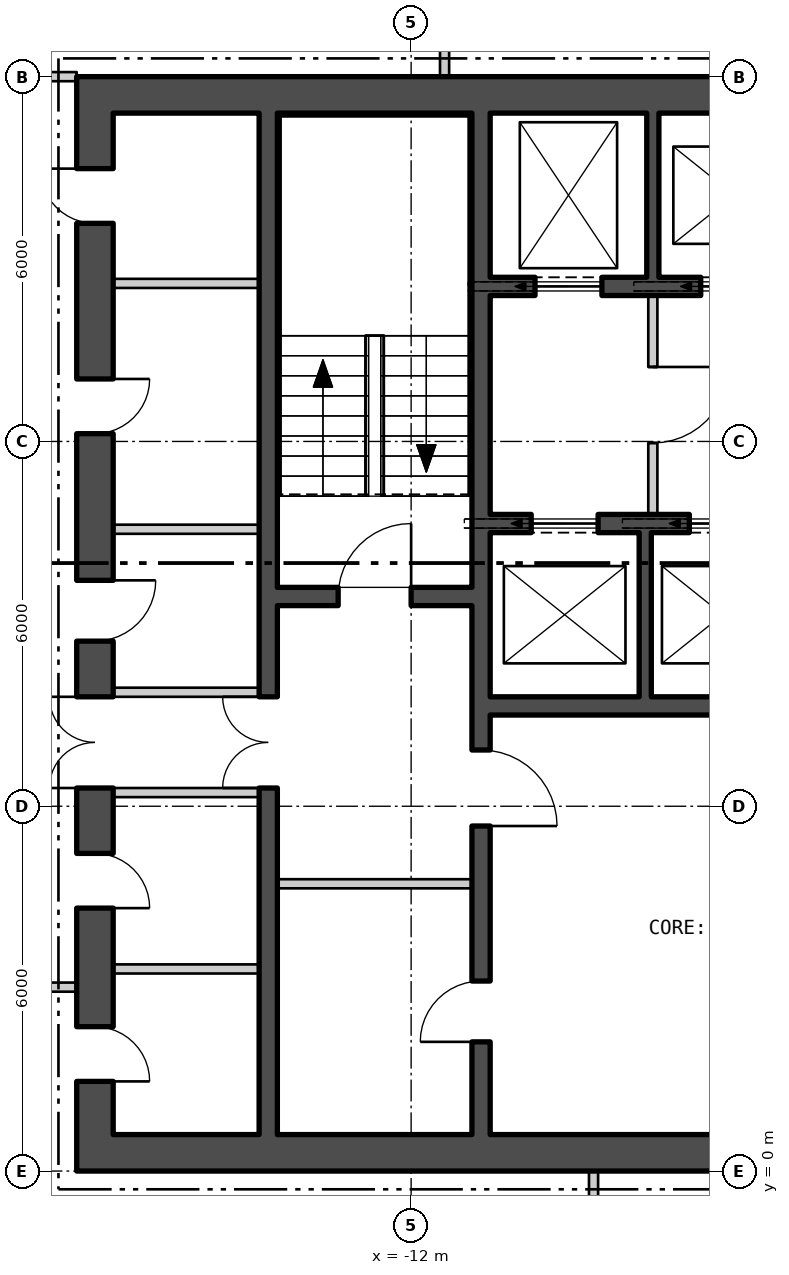
"""IFC4 building model, lengths in metres.
Left out: names, types, materials, properties, quantities, classifications, styles, units other than length and angle.
Written with IfcOpenShell. Run it as: python <this file> out.ifc"""

import sys

from ifc_helpers import new_model, si_unit, direction, frame, frame_2d, origin, place, context, subcontext, project, spatial, rectangle, extrude, element, fill, save


model = new_model("IFC4")
c1 = context("Model", 3, precision=1e-05, world=origin(), true_north=direction((0.0, 1.0)))
c2 = subcontext(c1, "Body", "Model", "MODEL_VIEW")
j1 = project(units=[si_unit("LENGTHUNIT", "METRE"), si_unit("PLANEANGLEUNIT", "RADIAN")], contexts=[c1])
p1 = place(None, origin())
s1 = spatial("IfcSite", under=j1, at=p1, CompositionType="ELEMENT")
p2 = place(p1, origin())
s2 = spatial("IfcBuilding", under=s1, at=p2, CompositionType="ELEMENT")
p3 = place(p2, frame((0.0, 0.0, 18.6)))
s3 = spatial("IfcBuildingStorey", under=s2, at=p3, CompositionType="ELEMENT", Elevation=18.6)
p4 = place(p3, frame((-17.5, 0.3, 0.0), z_axis=(0.0, 0.0, 1.0), x_axis=(1.0, 0.0, 0.0)))
e1 = element("IfcWall", 1, at=p4, inside=s3, PredefinedType="SHEAR", context=c2, shape_type="SweptSolid", body=[
    extrude(rectangle(XDim=35.0, YDim=0.6, at=frame_2d((17.5, 0.0))), origin(), (0.0, 0.0, 1.0), 4.88),
])
p5 = place(p4, frame((12.0, 0.0, 0.0)))
e2 = element("IfcOpeningElement", 2, at=p5, cuts=e1, PredefinedType="OPENING", context=c2, shape_type="SweptSolid", body=[
    extrude(rectangle(XDim=1.8, YDim=2.4, at=frame_2d((0.9, 1.2))), frame((0.0, 0.31, 0.0), z_axis=(0.0, -1.0, 0.0), x_axis=(1.0, 0.0, 0.0)), (0.0, 0.0, 1.0), 0.62),
])
p6 = place(p4, frame((22.0, 0.0, 0.0)))
e3 = element("IfcOpeningElement", 3, at=p6, cuts=e1, PredefinedType="OPENING", context=c2, shape_type="SweptSolid", body=[
    extrude(rectangle(XDim=1.8, YDim=2.4, at=frame_2d((0.9, 1.2))), frame((0.0, 0.31, 0.0), z_axis=(0.0, -1.0, 0.0), x_axis=(1.0, 0.0, 0.0)), (0.0, 0.0, 1.0), 0.62),
])
p7 = place(p3, frame((-17.5, 17.7, 0.0), z_axis=(0.0, 0.0, 1.0), x_axis=(1.0, 0.0, 0.0)))
e4 = element("IfcWall", 4, at=p7, inside=s3, PredefinedType="SHEAR", context=c2, shape_type="SweptSolid", body=[
    extrude(rectangle(XDim=35.0, YDim=0.6, at=frame_2d((17.5, 0.0))), origin(), (0.0, 0.0, 1.0), 4.88),
])
p8 = place(p3, frame((-17.2, 0.6, 0.0), z_axis=(0.0, 0.0, 1.0), x_axis=(0.0, 1.0, 0.0)))
e5 = element("IfcWall", 5, at=p8, inside=s3, PredefinedType="SHEAR", context=c2, shape_type="SweptSolid", body=[
    extrude(rectangle(XDim=16.8, YDim=0.6, at=frame_2d((8.4, 0.0))), origin(), (0.0, 0.0, 1.0), 4.88),
])
p9 = place(p8, frame((5.7, 0.0, 0.0)))
e6 = element("IfcOpeningElement", 6, at=p9, cuts=e5, PredefinedType="OPENING", context=c2, shape_type="SweptSolid", body=[
    extrude(rectangle(XDim=1.5, YDim=2.1, at=frame_2d((0.75, 1.05))), frame((0.0, 0.31, 0.0), z_axis=(0.0, -1.0, 0.0), x_axis=(1.0, 0.0, 0.0)), (0.0, 0.0, 1.0), 0.62),
])
p10 = place(p8, frame((0.875, 0.0, 0.0)))
e7 = element("IfcOpeningElement", 7, at=p10, cuts=e5, PredefinedType="OPENING", context=c2, shape_type="SweptSolid", body=[
    extrude(rectangle(XDim=0.9, YDim=2.1, at=frame_2d((0.45, 1.05))), frame((0.0, 0.31, 0.0), z_axis=(0.0, -1.0, 0.0), x_axis=(1.0, 0.0, 0.0)), (0.0, 0.0, 1.0), 0.62),
])
p11 = place(p8, frame((3.724, 0.0, 0.0)))
e8 = element("IfcOpeningElement", 8, at=p11, cuts=e5, PredefinedType="OPENING", context=c2, shape_type="SweptSolid", body=[
    extrude(rectangle(XDim=0.9, YDim=2.1, at=frame_2d((0.45, 1.05))), frame((0.0, 0.31, 0.0), z_axis=(0.0, -1.0, 0.0), x_axis=(1.0, 0.0, 0.0)), (0.0, 0.0, 1.0), 0.62),
])
p12 = place(p8, frame((8.115, 0.0, 0.0)))
e9 = element("IfcOpeningElement", 9, at=p12, cuts=e5, PredefinedType="OPENING", context=c2, shape_type="SweptSolid", body=[
    extrude(rectangle(XDim=1.0, YDim=2.1, at=frame_2d((0.5, 1.05))), frame((0.0, 0.31, 0.0), z_axis=(0.0, -1.0, 0.0), x_axis=(1.0, 0.0, 0.0)), (0.0, 0.0, 1.0), 0.62),
])
p13 = place(p8, frame((11.528, 0.0, 0.0)))
e10 = element("IfcOpeningElement", 10, at=p13, cuts=e5, PredefinedType="OPENING", context=c2, shape_type="SweptSolid", body=[
    extrude(rectangle(XDim=0.9, YDim=2.1, at=frame_2d((0.45, 1.05))), frame((0.0, 0.31, 0.0), z_axis=(0.0, -1.0, 0.0), x_axis=(1.0, 0.0, 0.0)), (0.0, 0.0, 1.0), 0.62),
])
p14 = place(p8, frame((14.987, 0.0, 0.0)))
e11 = element("IfcOpeningElement", 11, at=p14, cuts=e5, PredefinedType="OPENING", context=c2, shape_type="SweptSolid", body=[
    extrude(rectangle(XDim=0.9, YDim=2.1, at=frame_2d((0.45, 1.05))), frame((0.0, 0.31, 0.0), z_axis=(0.0, -1.0, 0.0), x_axis=(1.0, 0.0, 0.0)), (0.0, 0.0, 1.0), 0.62),
])
p15 = place(p3, frame((-10.85, 0.6, 0.0), z_axis=(0.0, 0.0, 1.0), x_axis=(0.0, 1.0, 0.0)))
e12 = element("IfcWall", 12, at=p15, inside=s3, PredefinedType="SHEAR", context=c2, shape_type="SweptSolid", body=[
    extrude(rectangle(XDim=16.8, YDim=0.3, at=frame_2d((8.4, 0.0))), origin(), (0.0, 0.0, 1.0), 4.88),
])
p16 = place(p15, frame((5.075, 0.0, 0.0)))
e13 = element("IfcOpeningElement", 13, at=p16, cuts=e12, PredefinedType="OPENING", context=c2, shape_type="SweptSolid", body=[
    extrude(rectangle(XDim=1.25, YDim=2.1, at=frame_2d((0.625, 1.05))), frame((0.0, 0.16, 0.0), z_axis=(0.0, -1.0, 0.0), x_axis=(1.0, 0.0, 0.0)), (0.0, 0.0, 1.0), 0.32),
])
p17 = place(p15, frame((1.525, 0.0, 0.0)))
e14 = element("IfcOpeningElement", 14, at=p17, cuts=e12, PredefinedType="OPENING", context=c2, shape_type="SweptSolid", body=[
    extrude(rectangle(XDim=1.0, YDim=2.1, at=frame_2d((0.5, 1.05))), frame((0.0, 0.16, 0.0), z_axis=(0.0, -1.0, 0.0), x_axis=(1.0, 0.0, 0.0)), (0.0, 0.0, 1.0), 0.32),
])
p18 = place(p3, frame((-14.35, 0.6, 0.0), z_axis=(0.0, 0.0, 1.0), x_axis=(0.0, 1.0, 0.0)))
e15 = element("IfcWall", 15, at=p18, inside=s3, PredefinedType="SHEAR", context=c2, shape_type="SweptSolid", body=[
    extrude(rectangle(XDim=16.8, YDim=0.3, at=frame_2d((8.4, 0.0))), origin(), (0.0, 0.0, 1.0), 4.88),
])
p19 = place(p18, frame((5.7, 0.0, 0.0)))
e16 = element("IfcOpeningElement", 16, at=p19, cuts=e15, PredefinedType="OPENING", context=c2, shape_type="SweptSolid", body=[
    extrude(rectangle(XDim=1.5, YDim=2.1, at=frame_2d((0.75, 1.05))), frame((0.0, 0.16, 0.0), z_axis=(0.0, -1.0, 0.0), x_axis=(1.0, 0.0, 0.0)), (0.0, 0.0, 1.0), 0.32),
])
p20 = place(p3, frame((-14.2, 9.45, 0.0), z_axis=(0.0, 0.0, 1.0), x_axis=(1.0, 0.0, 0.0)))
e17 = element("IfcWall", 17, at=p20, inside=s3, PredefinedType="SHEAR", context=c2, shape_type="SweptSolid", body=[
    extrude(rectangle(XDim=3.2, YDim=0.3, at=frame_2d((1.6, 0.0))), origin(), (0.0, 0.0, 1.0), 4.88),
])
p21 = place(p20, frame((1.0, 0.0, 0.0)))
e18 = element("IfcOpeningElement", 18, at=p21, cuts=e17, PredefinedType="OPENING", context=c2, shape_type="SweptSolid", body=[
    extrude(rectangle(XDim=1.2, YDim=2.1, at=frame_2d((0.6, 1.05))), frame((0.0, 0.16, 0.0), z_axis=(0.0, -1.0, 0.0), x_axis=(1.0, 0.0, 0.0)), (0.0, 0.0, 1.0), 0.32),
])
p22 = place(p3, frame((-10.7, 14.55, 0.0), z_axis=(0.0, 0.0, 1.0), x_axis=(1.0, 0.0, 0.0)))
e19 = element("IfcWall", 19, at=p22, inside=s3, PredefinedType="SHEAR", context=c2, shape_type="SweptSolid", body=[
    extrude(rectangle(XDim=21.4, YDim=0.3, at=frame_2d((10.7, 0.0))), origin(), (0.0, 0.0, 1.0), 4.88),
])
p23 = place(p22, frame((0.738, 0.0, 0.0)))
e20 = element("IfcOpeningElement", 20, at=p23, cuts=e19, PredefinedType="OPENING", context=c2, shape_type="SweptSolid", body=[
    extrude(rectangle(XDim=1.1, YDim=2.1, at=frame_2d((0.55, 1.05))), frame((0.0, 0.16, 0.0), z_axis=(0.0, -1.0, 0.0), x_axis=(1.0, 0.0, 0.0)), (0.0, 0.0, 1.0), 0.32),
])
p24 = place(p22, frame((3.462, 0.0, 0.0)))
e21 = element("IfcOpeningElement", 21, at=p24, cuts=e19, PredefinedType="OPENING", context=c2, shape_type="SweptSolid", body=[
    extrude(rectangle(XDim=1.1, YDim=2.1, at=frame_2d((0.55, 1.05))), frame((0.0, 0.16, 0.0), z_axis=(0.0, -1.0, 0.0), x_axis=(1.0, 0.0, 0.0)), (0.0, 0.0, 1.0), 0.32),
])
p25 = place(p22, frame((6.138, 0.0, 0.0)))
e22 = element("IfcOpeningElement", 22, at=p25, cuts=e19, PredefinedType="OPENING", context=c2, shape_type="SweptSolid", body=[
    extrude(rectangle(XDim=1.1, YDim=2.1, at=frame_2d((0.55, 1.05))), frame((0.0, 0.16, 0.0), z_axis=(0.0, -1.0, 0.0), x_axis=(1.0, 0.0, 0.0)), (0.0, 0.0, 1.0), 0.32),
])
p26 = place(p22, frame((8.812, 0.0, 0.0)))
e23 = element("IfcOpeningElement", 23, at=p26, cuts=e19, PredefinedType="OPENING", context=c2, shape_type="SweptSolid", body=[
    extrude(rectangle(XDim=1.1, YDim=2.1, at=frame_2d((0.55, 1.05))), frame((0.0, 0.16, 0.0), z_axis=(0.0, -1.0, 0.0), x_axis=(1.0, 0.0, 0.0)), (0.0, 0.0, 1.0), 0.32),
])
p27 = place(p22, frame((14.162, 0.0, 0.0)))
e24 = element("IfcOpeningElement", 24, at=p27, cuts=e19, PredefinedType="OPENING", context=c2, shape_type="SweptSolid", body=[
    extrude(rectangle(XDim=1.1, YDim=2.1, at=frame_2d((0.55, 1.05))), frame((0.0, 0.16, 0.0), z_axis=(0.0, -1.0, 0.0), x_axis=(1.0, 0.0, 0.0)), (0.0, 0.0, 1.0), 0.32),
])
p28 = place(p22, frame((16.837, 0.0, 0.0)))
e25 = element("IfcOpeningElement", 25, at=p28, cuts=e19, PredefinedType="OPENING", context=c2, shape_type="SweptSolid", body=[
    extrude(rectangle(XDim=1.1, YDim=2.1, at=frame_2d((0.55, 1.05))), frame((0.0, 0.16, 0.0), z_axis=(0.0, -1.0, 0.0), x_axis=(1.0, 0.0, 0.0)), (0.0, 0.0, 1.0), 0.32),
])
p29 = place(p22, frame((19.562, 0.0, 0.0)))
e26 = element("IfcOpeningElement", 26, at=p29, cuts=e19, PredefinedType="OPENING", context=c2, shape_type="SweptSolid", body=[
    extrude(rectangle(XDim=1.1, YDim=2.1, at=frame_2d((0.55, 1.05))), frame((0.0, 0.16, 0.0), z_axis=(0.0, -1.0, 0.0), x_axis=(1.0, 0.0, 0.0)), (0.0, 0.0, 1.0), 0.32),
])
p30 = place(p3, frame((-10.7, 10.65, 0.0), z_axis=(0.0, 0.0, 1.0), x_axis=(1.0, 0.0, 0.0)))
e27 = element("IfcWall", 27, at=p30, inside=s3, PredefinedType="SHEAR", context=c2, shape_type="SweptSolid", body=[
    extrude(rectangle(XDim=10.3, YDim=0.3, at=frame_2d((5.15, 0.0))), origin(), (0.0, 0.0, 1.0), 4.88),
])
p31 = place(p30, frame((0.675, 0.0, 0.0)))
e28 = element("IfcOpeningElement", 28, at=p31, cuts=e27, PredefinedType="OPENING", context=c2, shape_type="SweptSolid", body=[
    extrude(rectangle(XDim=1.1, YDim=2.1, at=frame_2d((0.55, 1.05))), frame((0.0, 0.16, 0.0), z_axis=(0.0, -1.0, 0.0), x_axis=(1.0, 0.0, 0.0)), (0.0, 0.0, 1.0), 0.32),
])
p32 = place(p30, frame((3.275, 0.0, 0.0)))
e29 = element("IfcOpeningElement", 29, at=p32, cuts=e27, PredefinedType="OPENING", context=c2, shape_type="SweptSolid", body=[
    extrude(rectangle(XDim=1.1, YDim=2.1, at=frame_2d((0.55, 1.05))), frame((0.0, 0.16, 0.0), z_axis=(0.0, -1.0, 0.0), x_axis=(1.0, 0.0, 0.0)), (0.0, 0.0, 1.0), 0.32),
])
p33 = place(p30, frame((5.825, 0.0, 0.0)))
e30 = element("IfcOpeningElement", 30, at=p33, cuts=e27, PredefinedType="OPENING", context=c2, shape_type="SweptSolid", body=[
    extrude(rectangle(XDim=1.1, YDim=2.1, at=frame_2d((0.55, 1.05))), frame((0.0, 0.16, 0.0), z_axis=(0.0, -1.0, 0.0), x_axis=(1.0, 0.0, 0.0)), (0.0, 0.0, 1.0), 0.32),
])
p34 = place(p30, frame((8.375, 0.0, 0.0)))
e31 = element("IfcOpeningElement", 31, at=p34, cuts=e27, PredefinedType="OPENING", context=c2, shape_type="SweptSolid", body=[
    extrude(rectangle(XDim=1.1, YDim=2.1, at=frame_2d((0.55, 1.05))), frame((0.0, 0.16, 0.0), z_axis=(0.0, -1.0, 0.0), x_axis=(1.0, 0.0, 0.0)), (0.0, 0.0, 1.0), 0.32),
])
p35 = place(p3, frame((-10.7, 7.65, 0.0), z_axis=(0.0, 0.0, 1.0), x_axis=(1.0, 0.0, 0.0)))
e32 = element("IfcWall", 32, at=p35, inside=s3, PredefinedType="SHEAR", context=c2, shape_type="SweptSolid", body=[
    extrude(rectangle(XDim=10.3, YDim=0.3, at=frame_2d((5.15, 0.0))), origin(), (0.0, 0.0, 1.0), 4.88),
])
for number, where, z_axis, x_axis in (
    (33, (-8.025, 14.7, 0.0), (0.0, 0.0, 1.0), (0.0, 1.0, 0.0)),
    (34, (-8.15, 7.8, 0.0), (0.0, 0.0, 1.0), (0.0, 1.0, 0.0)),
):
    element("IfcWall", number, at=place(p3, frame(where, z_axis=z_axis, x_axis=x_axis)), inside=s3, PredefinedType="SHEAR", context=c2, shape_type="SweptSolid", body=[
        extrude(rectangle(XDim=2.7, YDim=0.2, at=frame_2d((1.35, 0.0))), origin(), (0.0, 0.0, 1.0), 4.88),
    ])
p36 = place(p3, frame((-8.025, 10.8, 0.0), z_axis=(0.0, 0.0, 1.0), x_axis=(0.0, 1.0, 0.0)))
e35 = element("IfcWall", 35, at=p36, inside=s3, PredefinedType="PARTITIONING", context=c2, shape_type="SweptSolid", body=[
    extrude(rectangle(XDim=3.6, YDim=0.15, at=frame_2d((1.8, 0.0))), origin(), (0.0, 0.0, 1.0), 4.88),
])
p37 = place(p36, frame((1.175, 0.0, 0.0)))
e36 = element("IfcOpeningElement", 36, at=p37, cuts=e35, PredefinedType="OPENING", context=c2, shape_type="SweptSolid", body=[
    extrude(rectangle(XDim=1.25, YDim=2.1, at=frame_2d((0.625, 1.05))), frame((0.0, 0.085, 0.0), z_axis=(0.0, -1.0, 0.0), x_axis=(1.0, 0.0, 0.0)), (0.0, 0.0, 1.0), 0.17),
])
p38 = place(p3, frame((-14.2, 4.725, 0.0), z_axis=(0.0, 0.0, 1.0), x_axis=(1.0, 0.0, 0.0)))
e37 = element("IfcWall", 37, at=p38, inside=s3, PredefinedType="PARTITIONING", context=c2, shape_type="SweptSolid", body=[
    extrude(rectangle(XDim=3.2, YDim=0.15, at=frame_2d((1.6, 0.0))), origin(), (0.0, 0.0, 1.0), 4.88),
])
for number, where, z_axis, x_axis in (
    (38, (-16.9, 6.225, 0.0), (0.0, 0.0, 1.0), (1.0, 0.0, 0.0)),
    (39, (-16.9, 7.875, 0.0), (0.0, 0.0, 1.0), (1.0, 0.0, 0.0)),
    (40, (-16.9, 3.324, 0.0), (0.0, 0.0, 1.0), (1.0, 0.0, 0.0)),
    (41, (-16.9, 10.556, 0.0), (0.0, 0.0, 1.0), (1.0, 0.0, 0.0)),
    (42, (-16.9, 14.6, 0.0), (0.0, 0.0, 1.0), (1.0, 0.0, 0.0)),
):
    element("IfcWall", number, at=place(p3, frame(where, z_axis=z_axis, x_axis=x_axis)), inside=s3, PredefinedType="PARTITIONING", context=c2, shape_type="SweptSolid", body=[
        extrude(rectangle(XDim=2.4, YDim=0.15, at=frame_2d((1.2, 0.0))), origin(), (0.0, 0.0, 1.0), 4.88),
    ])
p39 = place(p3, frame((-19.975, 18.0, 0.0), z_axis=(0.0, 0.0, 1.0), x_axis=(1.0, 0.0, 0.0)))
e43 = element("IfcWall", 43, at=p39, inside=s3, PredefinedType="PARTITIONING", context=c2, shape_type="SweptSolid", body=[
    extrude(rectangle(XDim=2.475, YDim=0.15, at=frame_2d((1.238, 0.0))), origin(), (0.0, 0.0, 1.0), 4.33),
])
p40 = place(p3, frame((-19.825, 3.025, 0.0), z_axis=(0.0, 0.0, 1.0), x_axis=(1.0, 0.0, 0.0)))
e44 = element("IfcWall", 44, at=p40, inside=s3, PredefinedType="PARTITIONING", context=c2, shape_type="SweptSolid", body=[
    extrude(rectangle(XDim=2.325, YDim=0.15, at=frame_2d((1.163, 0.0))), origin(), (0.0, 0.0, 1.0), 4.33),
])
p41 = place(p40, frame((0.662, 0.0, 0.0)))
e45 = element("IfcOpeningElement", 45, at=p41, cuts=e44, PredefinedType="OPENING", context=c2, shape_type="SweptSolid", body=[
    extrude(rectangle(XDim=1.0, YDim=2.1, at=frame_2d((0.5, 1.05))), frame((0.0, 0.085, 0.0), z_axis=(0.0, -1.0, 0.0), x_axis=(1.0, 0.0, 0.0)), (0.0, 0.0, 1.0), 0.17),
])
p42 = place(p3, frame((-11.45, 18.0, 0.0), z_axis=(0.0, 0.0, 1.0), x_axis=(0.0, 1.0, 0.0)))
e46 = element("IfcWall", 46, at=p42, inside=s3, PredefinedType="PARTITIONING", context=c2, shape_type="SweptSolid", body=[
    extrude(rectangle(XDim=1.75, YDim=0.15, at=frame_2d((0.875, 0.0))), origin(), (0.0, 0.0, 1.0), 4.88),
])
p43 = place(p3, frame((-9.0, -13.675, 0.0), z_axis=(0.0, 0.0, 1.0), x_axis=(0.0, 1.0, 0.0)))
e47 = element("IfcWall", 47, at=p43, inside=s3, PredefinedType="PARTITIONING", context=c2, shape_type="SweptSolid", body=[
    extrude(rectangle(XDim=13.675, YDim=0.15, at=frame_2d((6.838, 0.0))), origin(), (0.0, 0.0, 1.0), 4.88),
])
p44 = place(p43, frame((2.821, 0.0, 0.0)))
e48 = element("IfcOpeningElement", 48, at=p44, cuts=e47, PredefinedType="OPENING", context=c2, shape_type="SweptSolid", body=[
    extrude(rectangle(XDim=1.0, YDim=2.1, at=frame_2d((0.5, 1.05))), frame((0.0, 0.085, 0.0), z_axis=(0.0, -1.0, 0.0), x_axis=(1.0, 0.0, 0.0)), (0.0, 0.0, 1.0), 0.17),
])
p45 = place(p43, frame((11.975, 0.0, 0.0)))
e49 = element("IfcOpeningElement", 49, at=p45, cuts=e47, PredefinedType="OPENING", context=c2, shape_type="SweptSolid", body=[
    extrude(rectangle(XDim=1.0, YDim=2.1, at=frame_2d((0.5, 1.05))), frame((0.0, 0.085, 0.0), z_axis=(0.0, -1.0, 0.0), x_axis=(1.0, 0.0, 0.0)), (0.0, 0.0, 1.0), 0.17),
])
p46 = place(p23, origin())
e50 = element("IfcDoor", 50, at=p46, inside=s3, OperationType="SLIDING_TO_LEFT", PredefinedType="DOOR", context=c2, shape_type="SweptSolid", body=[
    extrude(rectangle(XDim=1.1, YDim=2.1, at=frame_2d((0.55, 1.05))), frame((0.0, 0.025, 0.0), z_axis=(0.0, -1.0, 0.0), x_axis=(1.0, 0.0, 0.0)), (0.0, 0.0, 1.0), 0.05),
])
fill(e20, e50)
p47 = place(p24, origin())
e51 = element("IfcDoor", 51, at=p47, inside=s3, OperationType="SLIDING_TO_LEFT", PredefinedType="DOOR", context=c2, shape_type="SweptSolid", body=[
    extrude(rectangle(XDim=1.1, YDim=2.1, at=frame_2d((0.55, 1.05))), frame((0.0, 0.025, 0.0), z_axis=(0.0, -1.0, 0.0), x_axis=(1.0, 0.0, 0.0)), (0.0, 0.0, 1.0), 0.05),
])
fill(e21, e51)
p48 = place(p31, origin())
e52 = element("IfcDoor", 52, at=p48, inside=s3, OperationType="SLIDING_TO_LEFT", PredefinedType="DOOR", context=c2, shape_type="SweptSolid", body=[
    extrude(rectangle(XDim=1.1, YDim=2.1, at=frame_2d((0.55, 1.05))), frame((0.0, 0.025, 0.0), z_axis=(0.0, -1.0, 0.0), x_axis=(1.0, 0.0, 0.0)), (0.0, 0.0, 1.0), 0.05),
])
fill(e28, e52)
p49 = place(p32, origin())
e53 = element("IfcDoor", 53, at=p49, inside=s3, OperationType="SLIDING_TO_LEFT", PredefinedType="DOOR", context=c2, shape_type="SweptSolid", body=[
    extrude(rectangle(XDim=1.1, YDim=2.1, at=frame_2d((0.55, 1.05))), frame((0.0, 0.025, 0.0), z_axis=(0.0, -1.0, 0.0), x_axis=(1.0, 0.0, 0.0)), (0.0, 0.0, 1.0), 0.05),
])
fill(e29, e53)
p50 = place(p37, origin())
e54 = element("IfcDoor", 54, at=p50, inside=s3, OperationType="SINGLE_SWING_RIGHT", PredefinedType="DOOR", context=c2, shape_type="SweptSolid", body=[
    extrude(rectangle(XDim=1.25, YDim=2.1, at=frame_2d((0.625, 1.05))), frame((0.0, 0.025, 0.0), z_axis=(0.0, -1.0, 0.0), x_axis=(1.0, 0.0, 0.0)), (0.0, 0.0, 1.0), 0.05),
])
fill(e36, e54)
p51 = place(p21, origin())
e55 = element("IfcDoor", 55, at=p51, inside=s3, OperationType="SINGLE_SWING_LEFT", PredefinedType="DOOR", context=c2, shape_type="SweptSolid", body=[
    extrude(rectangle(XDim=1.2, YDim=2.1, at=frame_2d((0.6, 1.05))), frame((0.0, 0.025, 0.0), z_axis=(0.0, -1.0, 0.0), x_axis=(1.0, 0.0, 0.0)), (0.0, 0.0, 1.0), 0.05),
])
fill(e18, e55)
p52 = place(p16, origin())
e56 = element("IfcDoor", 56, at=p52, inside=s3, OperationType="SINGLE_SWING_LEFT", PredefinedType="DOOR", context=c2, shape_type="SweptSolid", body=[
    extrude(rectangle(XDim=1.25, YDim=2.1, at=frame_2d((0.625, 1.05))), frame((0.0, 0.025, 0.0), z_axis=(0.0, -1.0, 0.0), x_axis=(1.0, 0.0, 0.0)), (0.0, 0.0, 1.0), 0.05),
])
fill(e13, e56)
p53 = place(p17, origin())
e57 = element("IfcDoor", 57, at=p53, inside=s3, OperationType="SINGLE_SWING_RIGHT", PredefinedType="DOOR", context=c2, shape_type="SweptSolid", body=[
    extrude(rectangle(XDim=1.0, YDim=2.1, at=frame_2d((0.5, 1.05))), frame((0.0, 0.025, 0.0), z_axis=(0.0, -1.0, 0.0), x_axis=(1.0, 0.0, 0.0)), (0.0, 0.0, 1.0), 0.05),
])
fill(e14, e57)
p54 = place(p19, origin())
e58 = element("IfcDoor", 58, at=p54, inside=s3, OperationType="DOUBLE_DOOR_SINGLE_SWING", PredefinedType="DOOR", context=c2, shape_type="SweptSolid", body=[
    extrude(rectangle(XDim=1.5, YDim=2.1, at=frame_2d((0.75, 1.05))), frame((0.0, 0.025, 0.0), z_axis=(0.0, -1.0, 0.0), x_axis=(1.0, 0.0, 0.0)), (0.0, 0.0, 1.0), 0.05),
])
fill(e16, e58)
p55 = place(p9, origin())
e59 = element("IfcDoor", 59, at=p55, inside=s3, OperationType="DOUBLE_DOOR_SINGLE_SWING", PredefinedType="DOOR", context=c2, shape_type="SweptSolid", body=[
    extrude(rectangle(XDim=1.5, YDim=2.1, at=frame_2d((0.75, 1.05))), frame((0.0, 0.025, 0.0), z_axis=(0.0, -1.0, 0.0), x_axis=(1.0, 0.0, 0.0)), (0.0, 0.0, 1.0), 0.05),
])
fill(e6, e59)
p56 = place(p10, origin())
e60 = element("IfcDoor", 60, at=p56, inside=s3, OperationType="SINGLE_SWING_LEFT", PredefinedType="DOOR", context=c2, shape_type="SweptSolid", body=[
    extrude(rectangle(XDim=0.9, YDim=2.1, at=frame_2d((0.45, 1.05))), frame((0.0, 0.025, 0.0), z_axis=(0.0, -1.0, 0.0), x_axis=(1.0, 0.0, 0.0)), (0.0, 0.0, 1.0), 0.05),
])
fill(e7, e60)
p57 = place(p11, origin())
e61 = element("IfcDoor", 61, at=p57, inside=s3, OperationType="SINGLE_SWING_LEFT", PredefinedType="DOOR", context=c2, shape_type="SweptSolid", body=[
    extrude(rectangle(XDim=0.9, YDim=2.1, at=frame_2d((0.45, 1.05))), frame((0.0, 0.025, 0.0), z_axis=(0.0, -1.0, 0.0), x_axis=(1.0, 0.0, 0.0)), (0.0, 0.0, 1.0), 0.05),
])
fill(e8, e61)
p58 = place(p12, origin())
e62 = element("IfcDoor", 62, at=p58, inside=s3, OperationType="SINGLE_SWING_RIGHT", PredefinedType="DOOR", context=c2, shape_type="SweptSolid", body=[
    extrude(rectangle(XDim=1.0, YDim=2.1, at=frame_2d((0.5, 1.05))), frame((0.0, 0.025, 0.0), z_axis=(0.0, -1.0, 0.0), x_axis=(1.0, 0.0, 0.0)), (0.0, 0.0, 1.0), 0.05),
])
fill(e9, e62)
p59 = place(p13, origin())
e63 = element("IfcDoor", 63, at=p59, inside=s3, OperationType="SINGLE_SWING_RIGHT", PredefinedType="DOOR", context=c2, shape_type="SweptSolid", body=[
    extrude(rectangle(XDim=0.9, YDim=2.1, at=frame_2d((0.45, 1.05))), frame((0.0, 0.025, 0.0), z_axis=(0.0, -1.0, 0.0), x_axis=(1.0, 0.0, 0.0)), (0.0, 0.0, 1.0), 0.05),
])
fill(e10, e63)
p60 = place(p14, origin())
e64 = element("IfcDoor", 64, at=p60, inside=s3, OperationType="SINGLE_SWING_LEFT", PredefinedType="DOOR", context=c2, shape_type="SweptSolid", body=[
    extrude(rectangle(XDim=0.9, YDim=2.1, at=frame_2d((0.45, 1.05))), frame((0.0, 0.025, 0.0), z_axis=(0.0, -1.0, 0.0), x_axis=(1.0, 0.0, 0.0)), (0.0, 0.0, 1.0), 0.05),
])
fill(e11, e64)
save(model, sys.argv[1])
